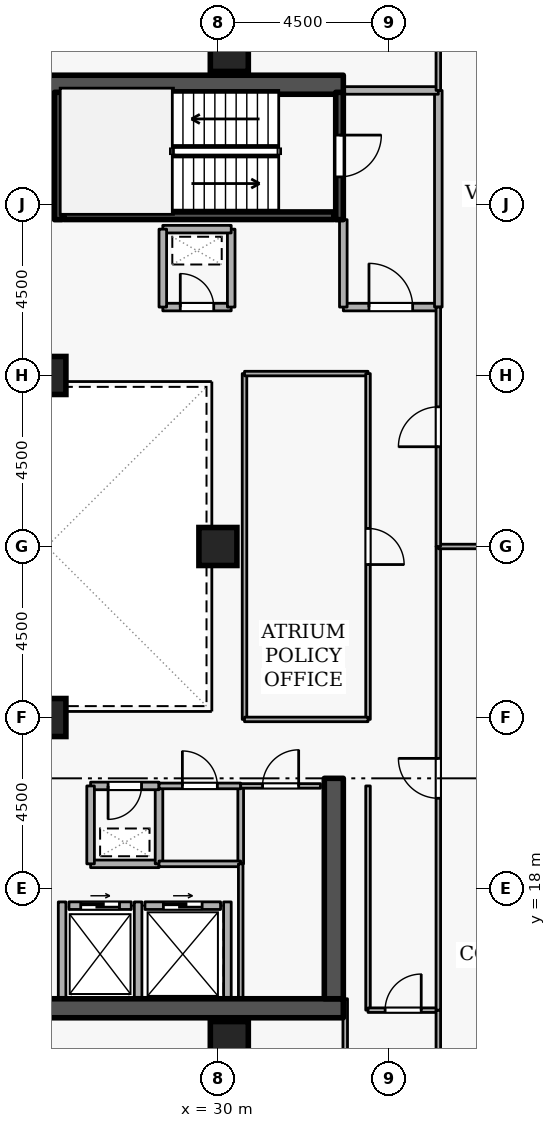
"""IFC4 building model, lengths in metres.
Left out: names, types, materials, properties, quantities, classifications, styles, units other than length and angle.
Written with IfcOpenShell. Run it as: python <this file> out.ifc"""

import sys

from ifc_helpers import new_model, si_unit, direction, frame, frame_2d, origin, origin_2d, place, context, subcontext, project, spatial, rectangle, extrude, element, fill, save


model = new_model("IFC4")
c1 = context("Model", 3, precision=1e-05, world=origin(), true_north=direction((0.0, 1.0)))
c2 = subcontext(c1, "Body", "Model", "MODEL_VIEW")
j1 = project(units=[si_unit("LENGTHUNIT", "METRE"), si_unit("PLANEANGLEUNIT", "RADIAN")], contexts=[c1])
p1 = place(None, origin())
s1 = spatial("IfcSite", under=j1, at=p1, CompositionType="ELEMENT")
p2 = place(p1, origin())
s2 = spatial("IfcBuilding", under=s1, at=p2, CompositionType="ELEMENT")
p3 = place(p2, frame((0.0, 0.0, 229.5)))
s3 = spatial("IfcBuildingStorey", under=s2, at=p3, CompositionType="ELEMENT", Elevation=229.5)
p4 = place(p3, frame((17.7, 14.85, 0.0), z_axis=(0.0, 0.0, 1.0), x_axis=(1.0, 0.0, 0.0)))
e1 = element("IfcWall", 1, at=p4, inside=s3, PredefinedType="SHEAR", context=c2, shape_type="SweptSolid", body=[
    extrude(rectangle(XDim=15.6, YDim=0.5, at=frame_2d((7.8, 0.0))), origin(), (0.0, 0.0, 1.0), 3.6),
])
p5 = place(p3, frame((33.05, 15.1, 0.0), z_axis=(0.0, 0.0, 1.0), x_axis=(0.0, 1.0, 0.0)))
e2 = element("IfcWall", 2, at=p5, inside=s3, PredefinedType="SHEAR", context=c2, shape_type="SweptSolid", body=[
    extrude(rectangle(XDim=5.8, YDim=0.5, at=frame_2d((2.9, 0.0))), origin(), (0.0, 0.0, 1.0), 3.6),
])
p6 = place(p3, frame((17.7, 39.15, 0.0), z_axis=(0.0, 0.0, 1.0), x_axis=(1.0, 0.0, 0.0)))
e3 = element("IfcWall", 3, at=p6, inside=s3, PredefinedType="SHEAR", context=c2, shape_type="SweptSolid", body=[
    extrude(rectangle(XDim=15.6, YDim=0.5, at=frame_2d((7.8, 0.0))), origin(), (0.0, 0.0, 1.0), 3.6),
])
for number, where, z_axis, x_axis in (
    (4, (30.3, 14.0, 0.0), (0.0, 0.0, 1.0), (1.0, 0.0, 0.0)),
    (5, (30.3, 40.0, 0.0), (0.0, 0.0, 1.0), (1.0, 0.0, 0.0)),
    (6, (25.5, 22.5, 0.0), (0.0, 0.0, 1.0), (1.0, 0.0, 0.0)),
    (7, (25.5, 31.5, 0.0), (0.0, 0.0, 1.0), (1.0, 0.0, 0.0)),
    (8, (30.0, 27.0, 0.0), (0.0, 0.0, 1.0), (1.0, 0.0, 0.0)),
):
    element("IfcColumn", number, at=place(p3, frame(where, z_axis=z_axis, x_axis=x_axis)), inside=s3, PredefinedType="COLUMN", context=c2, shape_type="SweptSolid", body=[
        extrude(rectangle(XDim=1.0, YDim=1.0, at=origin_2d()), origin(), (0.0, 0.0, 1.0), 3.6),
    ])
p7 = place(p3, frame((26.08, 17.55, 0.0), z_axis=(0.0, 0.0, 1.0), x_axis=(1.0, 0.0, 0.0)))
e9 = element("IfcWall", 9, at=p7, inside=s3, PredefinedType="STANDARD", context=c2, shape_type="SweptSolid", body=[
    extrude(rectangle(XDim=1.64, YDim=0.2, at=frame_2d((0.82, 0.0))), origin(), (0.0, 0.0, 1.0), 3.3),
])
p8 = place(p7, frame((0.31, 0.0, 0.0)))
e10 = element("IfcOpeningElement", 10, at=p8, cuts=e9, PredefinedType="OPENING", context=c2, shape_type="SweptSolid", body=[
    extrude(rectangle(XDim=1.02, YDim=2.06, at=frame_2d((0.51, 1.03))), frame((0.0, 0.11, 0.0), z_axis=(0.0, -1.0, 0.0), x_axis=(1.0, 0.0, 0.0)), (0.0, 0.0, 1.0), 0.22),
])
p9 = place(p3, frame((28.08, 17.55, 0.0), z_axis=(0.0, 0.0, 1.0), x_axis=(1.0, 0.0, 0.0)))
e11 = element("IfcWall", 11, at=p9, inside=s3, PredefinedType="STANDARD", context=c2, shape_type="SweptSolid", body=[
    extrude(rectangle(XDim=1.99, YDim=0.2, at=frame_2d((0.995, 0.0))), origin(), (0.0, 0.0, 1.0), 3.3),
])
p10 = place(p9, frame((0.485, 0.0, 0.0)))
e12 = element("IfcOpeningElement", 12, at=p10, cuts=e11, PredefinedType="OPENING", context=c2, shape_type="SweptSolid", body=[
    extrude(rectangle(XDim=1.02, YDim=2.06, at=frame_2d((0.51, 1.03))), frame((0.0, 0.11, 0.0), z_axis=(0.0, -1.0, 0.0), x_axis=(1.0, 0.0, 0.0)), (0.0, 0.0, 1.0), 0.22),
])
for number, where, z_axis, x_axis in (
    (13, (27.9, 15.112, 0.0), (0.0, 0.0, 1.0), (0.0, 1.0, 0.0)),
    (14, (25.9, 15.112, 0.0), (0.0, 0.0, 1.0), (0.0, 1.0, 0.0)),
    (15, (30.25, 15.112, 0.0), (0.0, 0.0, 1.0), (0.0, 1.0, 0.0)),
):
    element("IfcWall", number, at=place(p3, frame(where, z_axis=z_axis, x_axis=x_axis)), inside=s3, PredefinedType="STANDARD", context=c2, shape_type="SweptSolid", body=[
        extrude(rectangle(XDim=2.536, YDim=0.2, at=frame_2d((1.268, 0.0))), origin(), (0.0, 0.0, 1.0), 3.3),
    ])
p11 = place(p3, frame((33.2, 38.95, 0.0), z_axis=(0.0, 0.0, 1.0), x_axis=(0.0, -1.0, 0.0)))
e16 = element("IfcWall", 16, at=p11, inside=s3, PredefinedType="SHEAR", context=c2, shape_type="SweptSolid", body=[
    extrude(rectangle(XDim=3.35, YDim=0.2, at=frame_2d((1.675, 0.0))), origin(), (0.0, 0.0, 1.0), 3.6),
])
p12 = place(p11, frame((1.125, 0.0, 0.0)))
e17 = element("IfcOpeningElement", 17, at=p12, cuts=e16, PredefinedType="OPENING", context=c2, shape_type="SweptSolid", body=[
    extrude(rectangle(XDim=1.1, YDim=2.1, at=frame_2d((0.55, 1.05))), frame((0.0, 0.11, 0.0), z_axis=(0.0, -1.0, 0.0), x_axis=(1.0, 0.0, 0.0)), (0.0, 0.0, 1.0), 0.22),
])
p13 = place(p3, frame((25.8, 35.6, 0.0), z_axis=(0.0, 0.0, 1.0), x_axis=(0.0, 1.0, 0.0)))
e18 = element("IfcWall", 18, at=p13, inside=s3, PredefinedType="SHEAR", context=c2, shape_type="SweptSolid", body=[
    extrude(rectangle(XDim=3.35, YDim=0.2, at=frame_2d((1.675, 0.0))), origin(), (0.0, 0.0, 1.0), 3.6),
])
p14 = place(p3, frame((25.95, 35.703, 0.0), z_axis=(0.0, 0.0, 1.0), x_axis=(1.0, 0.0, 0.0)))
e19 = element("IfcWall", 19, at=p14, inside=s3, PredefinedType="SHEAR", context=c2, shape_type="SweptSolid", body=[
    extrude(rectangle(XDim=7.1, YDim=0.2, at=frame_2d((3.55, 0.0))), origin(), (0.0, 0.0, 1.0), 3.6),
])
p15 = place(p3, frame((33.3, 33.3, 0.0), z_axis=(0.0, 0.0, 1.0), x_axis=(1.0, 0.0, 0.0)))
e20 = element("IfcWall", 20, at=p15, inside=s3, PredefinedType="STANDARD", context=c2, shape_type="SweptSolid", body=[
    extrude(rectangle(XDim=2.5, YDim=0.2, at=frame_2d((1.25, 0.0))), origin(), (0.0, 0.0, 1.0), 3.3),
])
p16 = place(p15, frame((0.675, 0.0, 0.0)))
e21 = element("IfcOpeningElement", 21, at=p16, cuts=e20, PredefinedType="OPENING", context=c2, shape_type="SweptSolid", body=[
    extrude(rectangle(XDim=1.15, YDim=2.1, at=frame_2d((0.575, 1.05))), frame((0.0, 0.11, 0.0), z_axis=(0.0, -1.0, 0.0), x_axis=(1.0, 0.0, 0.0)), (0.0, 0.0, 1.0), 0.22),
])
p17 = place(p3, frame((35.8, 33.3, 0.0), z_axis=(0.0, 0.0, 1.0), x_axis=(0.0, 1.0, 0.0)))
e22 = element("IfcWall", 22, at=p17, inside=s3, PredefinedType="STANDARD", context=c2, shape_type="SweptSolid", body=[
    extrude(rectangle(XDim=5.7, YDim=0.2, at=frame_2d((2.85, 0.0))), origin(), (0.0, 0.0, 1.0), 3.3),
])
p18 = place(p3, frame((35.8, 39.0, 0.0), z_axis=(0.0, 0.0, 1.0), x_axis=(-1.0, 0.0, 0.0)))
e23 = element("IfcWall", 23, at=p18, inside=s3, PredefinedType="STANDARD", context=c2, shape_type="SweptSolid", body=[
    extrude(rectangle(XDim=2.5, YDim=0.2, at=frame_2d((1.25, 0.0))), origin(), (0.0, 0.0, 1.0), 3.3),
])
p19 = place(p3, frame((33.3, 35.6, 0.0), z_axis=(0.0, 0.0, 1.0), x_axis=(0.0, -1.0, 0.0)))
e24 = element("IfcWall", 24, at=p19, inside=s3, PredefinedType="STANDARD", context=c2, shape_type="SweptSolid", body=[
    extrude(rectangle(XDim=2.3, YDim=0.2, at=frame_2d((1.15, 0.0))), origin(), (0.0, 0.0, 1.0), 2.505),
])
p20 = place(p3, frame((26.65, 18.65, 0.0), z_axis=(0.0, 0.0, 1.0), x_axis=(1.0, 0.0, 0.0)))
e25 = element("IfcWall", 25, at=p20, inside=s3, PredefinedType="STANDARD", context=c2, shape_type="SweptSolid", body=[
    extrude(rectangle(XDim=1.8, YDim=0.2, at=frame_2d((0.9, 0.0))), origin(), (0.0, 0.0, 1.0), 3.3),
])
p21 = place(p3, frame((28.45, 18.65, 0.0), z_axis=(0.0, 0.0, 1.0), x_axis=(0.0, 1.0, 0.0)))
e26 = element("IfcWall", 26, at=p21, inside=s3, PredefinedType="STANDARD", context=c2, shape_type="SweptSolid", body=[
    extrude(rectangle(XDim=2.05, YDim=0.2, at=frame_2d((1.025, 0.0))), origin(), (0.0, 0.0, 1.0), 3.3),
])
p22 = place(p3, frame((28.45, 20.7, 0.0), z_axis=(0.0, 0.0, 1.0), x_axis=(-1.0, 0.0, 0.0)))
e27 = element("IfcWall", 27, at=p22, inside=s3, PredefinedType="STANDARD", context=c2, shape_type="SweptSolid", body=[
    extrude(rectangle(XDim=1.8, YDim=0.2, at=frame_2d((0.9, 0.0))), origin(), (0.0, 0.0, 1.0), 3.3),
])
p23 = place(p22, frame((0.46, 0.0, 0.0)))
e28 = element("IfcOpeningElement", 28, at=p23, cuts=e27, PredefinedType="OPENING", context=c2, shape_type="SweptSolid", body=[
    extrude(rectangle(XDim=0.88, YDim=2.04, at=frame_2d((0.44, 1.02))), frame((0.0, 0.11, 0.0), z_axis=(0.0, -1.0, 0.0), x_axis=(1.0, 0.0, 0.0)), (0.0, 0.0, 1.0), 0.22),
])
p24 = place(p3, frame((26.65, 20.7, 0.0), z_axis=(0.0, 0.0, 1.0), x_axis=(0.0, -1.0, 0.0)))
e29 = element("IfcWall", 29, at=p24, inside=s3, PredefinedType="STANDARD", context=c2, shape_type="SweptSolid", body=[
    extrude(rectangle(XDim=2.05, YDim=0.2, at=frame_2d((1.025, 0.0))), origin(), (0.0, 0.0, 1.0), 3.3),
])
p25 = place(p3, frame((28.55, 33.3, 0.0), z_axis=(0.0, 0.0, 1.0), x_axis=(1.0, 0.0, 0.0)))
e30 = element("IfcWall", 30, at=p25, inside=s3, PredefinedType="STANDARD", context=c2, shape_type="SweptSolid", body=[
    extrude(rectangle(XDim=1.8, YDim=0.2, at=frame_2d((0.9, 0.0))), origin(), (0.0, 0.0, 1.0), 3.3),
])
p26 = place(p25, frame((0.46, 0.0, 0.0)))
e31 = element("IfcOpeningElement", 31, at=p26, cuts=e30, PredefinedType="OPENING", context=c2, shape_type="SweptSolid", body=[
    extrude(rectangle(XDim=0.88, YDim=2.04, at=frame_2d((0.44, 1.02))), frame((0.0, 0.11, 0.0), z_axis=(0.0, -1.0, 0.0), x_axis=(1.0, 0.0, 0.0)), (0.0, 0.0, 1.0), 0.22),
])
p27 = place(p3, frame((30.35, 33.3, 0.0), z_axis=(0.0, 0.0, 1.0), x_axis=(0.0, 1.0, 0.0)))
e32 = element("IfcWall", 32, at=p27, inside=s3, PredefinedType="STANDARD", context=c2, shape_type="SweptSolid", body=[
    extrude(rectangle(XDim=2.05, YDim=0.2, at=frame_2d((1.025, 0.0))), origin(), (0.0, 0.0, 1.0), 3.3),
])
p28 = place(p3, frame((30.35, 35.35, 0.0), z_axis=(0.0, 0.0, 1.0), x_axis=(-1.0, 0.0, 0.0)))
e33 = element("IfcWall", 33, at=p28, inside=s3, PredefinedType="STANDARD", context=c2, shape_type="SweptSolid", body=[
    extrude(rectangle(XDim=1.8, YDim=0.2, at=frame_2d((0.9, 0.0))), origin(), (0.0, 0.0, 1.0), 3.3),
])
p29 = place(p3, frame((28.55, 35.35, 0.0), z_axis=(0.0, 0.0, 1.0), x_axis=(0.0, -1.0, 0.0)))
e34 = element("IfcWall", 34, at=p29, inside=s3, PredefinedType="STANDARD", context=c2, shape_type="SweptSolid", body=[
    extrude(rectangle(XDim=2.05, YDim=0.2, at=frame_2d((1.025, 0.0))), origin(), (0.0, 0.0, 1.0), 3.3),
])
p30 = place(p3, frame((30.6, 20.7, 0.0), z_axis=(0.0, 0.0, 1.0), x_axis=(0.0, -1.0, 0.0)))
e35 = element("IfcWall", 35, at=p30, inside=s3, PredefinedType="PARTITIONING", context=c2, shape_type="SweptSolid", body=[
    extrude(rectangle(XDim=2.05, YDim=0.15, at=frame_2d((1.025, 0.0))), origin(), (0.0, 0.0, 1.0), 3.3),
])
p31 = place(p3, frame((30.6, 18.65, 0.0), z_axis=(0.0, 0.0, 1.0), x_axis=(-1.0, 0.0, 0.0)))
e36 = element("IfcWall", 36, at=p31, inside=s3, PredefinedType="PARTITIONING", context=c2, shape_type="SweptSolid", body=[
    extrude(rectangle(XDim=2.15, YDim=0.15, at=frame_2d((1.075, 0.0))), origin(), (0.0, 0.0, 1.0), 3.3),
])
p32 = place(p3, frame((28.45, 20.7, 0.0), z_axis=(0.0, 0.0, 1.0), x_axis=(1.0, 0.0, 0.0)))
e37 = element("IfcWall", 37, at=p32, inside=s3, PredefinedType="PARTITIONING", context=c2, shape_type="SweptSolid", body=[
    extrude(rectangle(XDim=2.15, YDim=0.15, at=frame_2d((1.075, 0.0))), origin(), (0.0, 0.0, 1.0), 3.3),
])
p33 = place(p32, frame((0.615, 0.0, 0.0)))
e38 = element("IfcOpeningElement", 38, at=p33, cuts=e37, PredefinedType="OPENING", context=c2, shape_type="SweptSolid", body=[
    extrude(rectangle(XDim=0.92, YDim=2.08, at=frame_2d((0.46, 1.04))), frame((0.0, 0.085, 0.0), z_axis=(0.0, -1.0, 0.0), x_axis=(1.0, 0.0, 0.0)), (0.0, 0.0, 1.0), 0.17),
])
p34 = place(p3, frame((30.6, 15.1, 0.0), z_axis=(0.0, 0.0, 1.0), x_axis=(0.0, 1.0, 0.0)))
e39 = element("IfcWall", 39, at=p34, inside=s3, PredefinedType="PARTITIONING", context=c2, shape_type="SweptSolid", body=[
    extrude(rectangle(XDim=3.55, YDim=0.12, at=frame_2d((1.775, 0.0))), origin(), (0.0, 0.0, 1.0), 3.3),
])
p35 = place(p3, frame((30.6, 20.7, 0.0), z_axis=(0.0, 0.0, 1.0), x_axis=(1.0, 0.0, 0.0)))
e40 = element("IfcWall", 40, at=p35, inside=s3, PredefinedType="PARTITIONING", context=c2, shape_type="SweptSolid", body=[
    extrude(rectangle(XDim=2.1, YDim=0.12, at=frame_2d((1.05, 0.0))), origin(), (0.0, 0.0, 1.0), 3.3),
])
p36 = place(p35, frame((0.575, 0.0, 0.0)))
e41 = element("IfcOpeningElement", 41, at=p36, cuts=e40, PredefinedType="OPENING", context=c2, shape_type="SweptSolid", body=[
    extrude(rectangle(XDim=0.95, YDim=2.1, at=frame_2d((0.475, 1.05))), frame((0.0, 0.07, 0.0), z_axis=(0.0, -1.0, 0.0), x_axis=(1.0, 0.0, 0.0)), (0.0, 0.0, 1.0), 0.14),
])
p37 = place(p3, frame((33.95, 20.7, 0.0), z_axis=(0.0, 0.0, 1.0), x_axis=(0.0, -1.0, 0.0)))
e42 = element("IfcWall", 42, at=p37, inside=s3, PredefinedType="PARTITIONING", context=c2, shape_type="SweptSolid", body=[
    extrude(rectangle(XDim=5.9, YDim=0.12, at=frame_2d((2.95, 0.0))), origin(), (0.0, 0.0, 1.0), 3.3),
])
p38 = place(p3, frame((33.95, 14.8, 0.0), z_axis=(0.0, 0.0, 1.0), x_axis=(1.0, 0.0, 0.0)))
e43 = element("IfcWall", 43, at=p38, inside=s3, PredefinedType="PARTITIONING", context=c2, shape_type="SweptSolid", body=[
    extrude(rectangle(XDim=1.85, YDim=0.12, at=frame_2d((0.925, 0.0))), origin(), (0.0, 0.0, 1.0), 3.3),
])
p39 = place(p38, frame((0.45, 0.0, 0.0)))
e44 = element("IfcOpeningElement", 44, at=p39, cuts=e43, PredefinedType="OPENING", context=c2, shape_type="SweptSolid", body=[
    extrude(rectangle(XDim=0.95, YDim=2.1, at=frame_2d((0.475, 1.05))), frame((0.0, 0.07, 0.0), z_axis=(0.0, -1.0, 0.0), x_axis=(1.0, 0.0, 0.0)), (0.0, 0.0, 1.0), 0.14),
])
p40 = place(p3, frame((35.8, 14.8, 0.0), z_axis=(0.0, 0.0, 1.0), x_axis=(0.0, -1.0, 0.0)))
e45 = element("IfcWall", 45, at=p40, inside=s3, PredefinedType="PARTITIONING", context=c2, shape_type="SweptSolid", body=[
    extrude(rectangle(XDim=11.52, YDim=0.12, at=frame_2d((5.76, 0.0))), origin(), (0.0, 0.0, 1.0), 3.3),
])
p41 = place(p3, frame((33.35, 3.28, 0.0), z_axis=(0.0, 0.0, 1.0), x_axis=(0.0, 1.0, 0.0)))
e46 = element("IfcWall", 46, at=p41, inside=s3, PredefinedType="PARTITIONING", context=c2, shape_type="SweptSolid", body=[
    extrude(rectangle(XDim=11.82, YDim=0.12, at=frame_2d((5.91, 0.0))), origin(), (0.0, 0.0, 1.0), 2.505),
])
p42 = place(p3, frame((35.8, 14.8, 0.0), z_axis=(0.0, 0.0, 1.0), x_axis=(0.0, 1.0, 0.0)))
e47 = element("IfcWall", 47, at=p42, inside=s3, PredefinedType="PARTITIONING", context=c2, shape_type="SweptSolid", body=[
    extrude(rectangle(XDim=12.2, YDim=0.12, at=frame_2d((6.1, 0.0))), origin(), (0.0, 0.0, 1.0), 3.3),
])
p43 = place(p42, frame((5.575, 0.0, 0.0)))
e48 = element("IfcOpeningElement", 48, at=p43, cuts=e47, PredefinedType="OPENING", context=c2, shape_type="SweptSolid", body=[
    extrude(rectangle(XDim=1.05, YDim=2.1, at=frame_2d((0.525, 1.05))), frame((0.0, 0.07, 0.0), z_axis=(0.0, -1.0, 0.0), x_axis=(1.0, 0.0, 0.0)), (0.0, 0.0, 1.0), 0.14),
])
p44 = place(p3, frame((35.8, 27.0, 0.0), z_axis=(0.0, 0.0, 1.0), x_axis=(1.0, 0.0, 0.0)))
e49 = element("IfcWall", 49, at=p44, inside=s3, PredefinedType="PARTITIONING", context=c2, shape_type="SweptSolid", body=[
    extrude(rectangle(XDim=7.42, YDim=0.12, at=frame_2d((3.71, 0.0))), origin(), (0.0, 0.0, 1.0), 2.892),
])
p45 = place(p3, frame((35.8, 39.0, 0.0), z_axis=(0.0, 0.0, 1.0), x_axis=(0.0, 1.0, 0.0)))
e50 = element("IfcWall", 50, at=p45, inside=s3, PredefinedType="PARTITIONING", context=c2, shape_type="SweptSolid", body=[
    extrude(rectangle(XDim=5.72, YDim=0.12, at=frame_2d((2.86, 0.0))), origin(), (0.0, 0.0, 1.0), 3.3),
])
p46 = place(p3, frame((35.8, 27.0, 0.0), z_axis=(0.0, 0.0, 1.0), x_axis=(0.0, 1.0, 0.0)))
e51 = element("IfcWall", 51, at=p46, inside=s3, PredefinedType="PARTITIONING", context=c2, shape_type="SweptSolid", body=[
    extrude(rectangle(XDim=6.3, YDim=0.12, at=frame_2d((3.15, 0.0))), origin(), (0.0, 0.0, 1.0), 3.3),
])
p47 = place(p46, frame((2.625, 0.0, 0.0)))
e52 = element("IfcOpeningElement", 52, at=p47, cuts=e51, PredefinedType="OPENING", context=c2, shape_type="SweptSolid", body=[
    extrude(rectangle(XDim=1.05, YDim=2.1, at=frame_2d((0.525, 1.05))), frame((0.0, 0.07, 0.0), z_axis=(0.0, -1.0, 0.0), x_axis=(1.0, 0.0, 0.0)), (0.0, 0.0, 1.0), 0.14),
])
p48 = place(p3, frame((30.7, 22.45, 0.0), z_axis=(0.0, 0.0, 1.0), x_axis=(0.0, 1.0, 0.0)))
e53 = element("IfcWall", 53, at=p48, inside=s3, PredefinedType="PARTITIONING", context=c2, shape_type="SweptSolid", body=[
    extrude(rectangle(XDim=9.1, YDim=0.12, at=frame_2d((4.55, 0.0))), origin(), (0.0, 0.0, 1.0), 3.3),
])
p49 = place(p3, frame((30.7, 31.55, 0.0), z_axis=(0.0, 0.0, 1.0), x_axis=(1.0, 0.0, 0.0)))
e54 = element("IfcWall", 54, at=p49, inside=s3, PredefinedType="PARTITIONING", context=c2, shape_type="SweptSolid", body=[
    extrude(rectangle(XDim=3.25, YDim=0.12, at=frame_2d((1.625, 0.0))), origin(), (0.0, 0.0, 1.0), 3.3),
])
p50 = place(p3, frame((33.95, 31.55, 0.0), z_axis=(0.0, 0.0, 1.0), x_axis=(0.0, -1.0, 0.0)))
e55 = element("IfcWall", 55, at=p50, inside=s3, PredefinedType="PARTITIONING", context=c2, shape_type="SweptSolid", body=[
    extrude(rectangle(XDim=9.1, YDim=0.12, at=frame_2d((4.55, 0.0))), origin(), (0.0, 0.0, 1.0), 3.3),
])
p51 = place(p50, frame((4.075, 0.0, 0.0)))
e56 = element("IfcOpeningElement", 56, at=p51, cuts=e55, PredefinedType="OPENING", context=c2, shape_type="SweptSolid", body=[
    extrude(rectangle(XDim=0.95, YDim=2.1, at=frame_2d((0.475, 1.05))), frame((0.0, 0.07, 0.0), z_axis=(0.0, -1.0, 0.0), x_axis=(1.0, 0.0, 0.0)), (0.0, 0.0, 1.0), 0.14),
])
p52 = place(p3, frame((33.95, 22.45, 0.0), z_axis=(0.0, 0.0, 1.0), x_axis=(-1.0, 0.0, 0.0)))
e57 = element("IfcWall", 57, at=p52, inside=s3, PredefinedType="PARTITIONING", context=c2, shape_type="SweptSolid", body=[
    extrude(rectangle(XDim=3.25, YDim=0.12, at=frame_2d((1.625, 0.0))), origin(), (0.0, 0.0, 1.0), 3.3),
])
p53 = place(p8, origin())
e58 = element("IfcDoor", 58, at=p53, inside=s3, OperationType="SLIDING_TO_LEFT", PredefinedType="DOOR", context=c2, shape_type="SweptSolid", body=[
    extrude(rectangle(XDim=1.02, YDim=2.06, at=frame_2d((0.51, 1.03))), frame((0.0, 0.025, 0.0), z_axis=(0.0, -1.0, 0.0), x_axis=(1.0, 0.0, 0.0)), (0.0, 0.0, 1.0), 0.05),
])
fill(e10, e58)
p54 = place(p10, origin())
e59 = element("IfcDoor", 59, at=p54, inside=s3, OperationType="SLIDING_TO_LEFT", PredefinedType="DOOR", context=c2, shape_type="SweptSolid", body=[
    extrude(rectangle(XDim=1.02, YDim=2.06, at=frame_2d((0.51, 1.03))), frame((0.0, 0.025, 0.0), z_axis=(0.0, -1.0, 0.0), x_axis=(1.0, 0.0, 0.0)), (0.0, 0.0, 1.0), 0.05),
])
fill(e12, e59)
p55 = place(p12, origin())
e60 = element("IfcDoor", 60, at=p55, inside=s3, OperationType="SINGLE_SWING_LEFT", PredefinedType="DOOR", context=c2, shape_type="SweptSolid", body=[
    extrude(rectangle(XDim=1.1, YDim=2.1, at=frame_2d((0.55, 1.05))), frame((0.0, 0.025, 0.0), z_axis=(0.0, -1.0, 0.0), x_axis=(1.0, 0.0, 0.0)), (0.0, 0.0, 1.0), 0.05),
])
fill(e17, e60)
p56 = place(p16, origin())
e61 = element("IfcDoor", 61, at=p56, inside=s3, OperationType="SINGLE_SWING_LEFT", PredefinedType="DOOR", context=c2, shape_type="SweptSolid", body=[
    extrude(rectangle(XDim=1.15, YDim=2.1, at=frame_2d((0.575, 1.05))), frame((0.0, 0.025, 0.0), z_axis=(0.0, -1.0, 0.0), x_axis=(1.0, 0.0, 0.0)), (0.0, 0.0, 1.0), 0.05),
])
fill(e21, e61)
p57 = place(p23, origin())
e62 = element("IfcDoor", 62, at=p57, inside=s3, OperationType="SINGLE_SWING_RIGHT", PredefinedType="DOOR", context=c2, shape_type="SweptSolid", body=[
    extrude(rectangle(XDim=0.88, YDim=2.04, at=frame_2d((0.44, 1.02))), frame((0.0, 0.025, 0.0), z_axis=(0.0, -1.0, 0.0), x_axis=(1.0, 0.0, 0.0)), (0.0, 0.0, 1.0), 0.05),
])
fill(e28, e62)
p58 = place(p26, origin())
e63 = element("IfcDoor", 63, at=p58, inside=s3, OperationType="SINGLE_SWING_LEFT", PredefinedType="DOOR", context=c2, shape_type="SweptSolid", body=[
    extrude(rectangle(XDim=0.88, YDim=2.04, at=frame_2d((0.44, 1.02))), frame((0.0, 0.025, 0.0), z_axis=(0.0, -1.0, 0.0), x_axis=(1.0, 0.0, 0.0)), (0.0, 0.0, 1.0), 0.05),
])
fill(e31, e63)
p59 = place(p33, origin())
e64 = element("IfcDoor", 64, at=p59, inside=s3, OperationType="SINGLE_SWING_LEFT", PredefinedType="DOOR", context=c2, shape_type="SweptSolid", body=[
    extrude(rectangle(XDim=0.92, YDim=2.08, at=frame_2d((0.46, 1.04))), frame((0.0, 0.025, 0.0), z_axis=(0.0, -1.0, 0.0), x_axis=(1.0, 0.0, 0.0)), (0.0, 0.0, 1.0), 0.05),
])
fill(e38, e64)
p60 = place(p36, origin())
e65 = element("IfcDoor", 65, at=p60, inside=s3, OperationType="SINGLE_SWING_RIGHT", PredefinedType="DOOR", context=c2, shape_type="SweptSolid", body=[
    extrude(rectangle(XDim=0.95, YDim=2.1, at=frame_2d((0.475, 1.05))), frame((0.0, 0.025, 0.0), z_axis=(0.0, -1.0, 0.0), x_axis=(1.0, 0.0, 0.0)), (0.0, 0.0, 1.0), 0.05),
])
fill(e41, e65)
p61 = place(p39, origin())
e66 = element("IfcDoor", 66, at=p61, inside=s3, OperationType="SINGLE_SWING_RIGHT", PredefinedType="DOOR", context=c2, shape_type="SweptSolid", body=[
    extrude(rectangle(XDim=0.95, YDim=2.1, at=frame_2d((0.475, 1.05))), frame((0.0, 0.025, 0.0), z_axis=(0.0, -1.0, 0.0), x_axis=(1.0, 0.0, 0.0)), (0.0, 0.0, 1.0), 0.05),
])
fill(e44, e66)
p62 = place(p43, origin())
e67 = element("IfcDoor", 67, at=p62, inside=s3, OperationType="SINGLE_SWING_RIGHT", PredefinedType="DOOR", context=c2, shape_type="SweptSolid", body=[
    extrude(rectangle(XDim=1.05, YDim=2.1, at=frame_2d((0.525, 1.05))), frame((0.0, 0.025, 0.0), z_axis=(0.0, -1.0, 0.0), x_axis=(1.0, 0.0, 0.0)), (0.0, 0.0, 1.0), 0.05),
])
fill(e48, e67)
p63 = place(p47, origin())
e68 = element("IfcDoor", 68, at=p63, inside=s3, OperationType="SINGLE_SWING_LEFT", PredefinedType="DOOR", context=c2, shape_type="SweptSolid", body=[
    extrude(rectangle(XDim=1.05, YDim=2.1, at=frame_2d((0.525, 1.05))), frame((0.0, 0.025, 0.0), z_axis=(0.0, -1.0, 0.0), x_axis=(1.0, 0.0, 0.0)), (0.0, 0.0, 1.0), 0.05),
])
fill(e52, e68)
p64 = place(p51, origin())
e69 = element("IfcDoor", 69, at=p64, inside=s3, OperationType="SINGLE_SWING_RIGHT", PredefinedType="DOOR", context=c2, shape_type="SweptSolid", body=[
    extrude(rectangle(XDim=0.95, YDim=2.1, at=frame_2d((0.475, 1.05))), frame((0.0, 0.025, 0.0), z_axis=(0.0, -1.0, 0.0), x_axis=(1.0, 0.0, 0.0)), (0.0, 0.0, 1.0), 0.05),
])
fill(e56, e69)
save(model, sys.argv[1])
